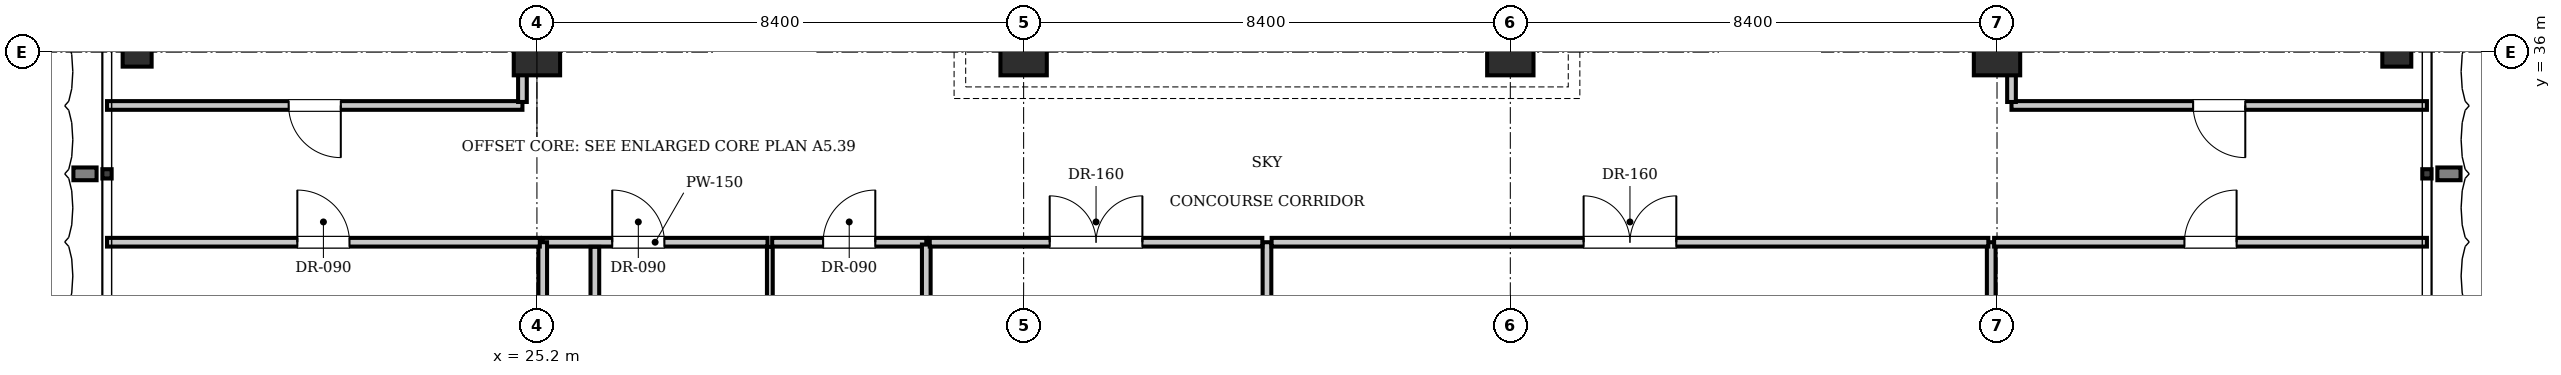
"""IFC4 building model, lengths in metres.
Left out: names, types, materials, properties, quantities, classifications, styles, units other than length and angle.
Written with IfcOpenShell. Run it as: python <this file> out.ifc"""

import sys

from ifc_helpers import new_model, si_unit, direction, frame, frame_2d, origin, origin_2d, place, context, subcontext, project, spatial, rectangle, i_section, extrude, element, fill, save


model = new_model("IFC4")
c1 = context("Model", 3, precision=1e-05, world=origin(), true_north=direction((0.0, 1.0)))
c2 = subcontext(c1, "Body", "Model", "MODEL_VIEW")
j1 = project(units=[si_unit("LENGTHUNIT", "METRE"), si_unit("PLANEANGLEUNIT", "RADIAN")], contexts=[c1])
p1 = place(None, origin())
s1 = spatial("IfcSite", under=j1, at=p1, CompositionType="ELEMENT")
p2 = place(p1, origin())
s2 = spatial("IfcBuilding", under=s1, at=p2, CompositionType="ELEMENT")
p3 = place(p2, frame((0.0, 0.0, 349.65)))
s3 = spatial("IfcBuildingStorey", under=s2, at=p3, CompositionType="ELEMENT", Elevation=349.65)
for number, where, z_axis, x_axis in (
    (1, (25.2, 36.0, 0.0), (0.0, 0.0, 1.0), (1.0, 0.0, 0.0)),
    (2, (33.6, 36.0, 0.0), (0.0, 0.0, 1.0), (1.0, 0.0, 0.0)),
    (3, (42.0, 36.0, 0.0), (0.0, 0.0, 1.0), (1.0, 0.0, 0.0)),
    (4, (50.4, 36.0, 0.0), (0.0, 0.0, 1.0), (1.0, 0.0, 0.0)),
):
    element("IfcColumn", number, at=place(p3, frame(where, z_axis=z_axis, x_axis=x_axis)), inside=s3, PredefinedType="COLUMN", context=c2, shape_type="SweptSolid", body=[
        extrude(rectangle(XDim=0.8, YDim=0.8, at=origin_2d()), origin(), (0.0, 0.0, 1.0), 4.55),
    ])
for number, where, z_axis, x_axis in (
    (5, (18.3, 36.0, 0.0), (0.0, 0.0, 1.0), (1.0, 0.0, 0.0)),
    (6, (57.3, 36.0, 0.0), (0.0, 0.0, 1.0), (1.0, 0.0, 0.0)),
):
    element("IfcColumn", number, at=place(p3, frame(where, z_axis=z_axis, x_axis=x_axis)), inside=s3, PredefinedType="COLUMN", context=c2, shape_type="SweptSolid", body=[
        extrude(i_section(OverallWidth=0.5, OverallDepth=0.5, WebThickness=0.022, FlangeThickness=0.032, at=origin_2d()), origin(), (0.0, 0.0, 1.0), 4.55),
    ])
p4 = place(p3, frame((25.3, 32.72, 0.0), z_axis=(0.0, 0.0, 1.0), x_axis=(1.0, 0.0, 0.0)))
e7 = element("IfcWall", 7, at=p4, inside=s3, PredefinedType="PARTITIONING", context=c2, shape_type="SweptSolid", body=[
    extrude(rectangle(XDim=3.88, YDim=0.15, at=frame_2d((1.94, 0.0))), origin(), (0.0, 0.0, 1.0), 4.29),
])
p5 = place(p4, frame((1.2, 0.0, 0.0)))
e8 = element("IfcOpeningElement", 8, at=p5, cuts=e7, PredefinedType="OPENING", context=c2, shape_type="SweptSolid", body=[
    extrude(rectangle(XDim=0.9, YDim=2.1, at=frame_2d((0.45, 1.05))), frame((0.0, 0.085, 0.0), z_axis=(0.0, -1.0, 0.0), x_axis=(1.0, 0.0, 0.0)), (0.0, 0.0, 1.0), 0.17),
])
p6 = place(p3, frame((29.26, 32.72, 0.0), z_axis=(0.0, 0.0, 1.0), x_axis=(1.0, 0.0, 0.0)))
e9 = element("IfcWall", 9, at=p6, inside=s3, PredefinedType="PARTITIONING", context=c2, shape_type="SweptSolid", body=[
    extrude(rectangle(XDim=2.66, YDim=0.15, at=frame_2d((1.33, 0.0))), origin(), (0.0, 0.0, 1.0), 4.29),
])
p7 = place(p6, frame((0.88, 0.0, 0.0)))
e10 = element("IfcOpeningElement", 10, at=p7, cuts=e9, PredefinedType="OPENING", context=c2, shape_type="SweptSolid", body=[
    extrude(rectangle(XDim=0.9, YDim=2.1, at=frame_2d((0.45, 1.05))), frame((0.0, 0.085, 0.0), z_axis=(0.0, -1.0, 0.0), x_axis=(1.0, 0.0, 0.0)), (0.0, 0.0, 1.0), 0.17),
])
p8 = place(p3, frame((26.2, 29.46, 0.0), z_axis=(0.0, 0.0, 1.0), x_axis=(0.0, 1.0, 0.0)))
e11 = element("IfcWall", 11, at=p8, inside=s3, PredefinedType="PARTITIONING", context=c2, shape_type="SweptSolid", body=[
    extrude(rectangle(XDim=3.18, YDim=0.15, at=frame_2d((1.59, 0.0))), origin(), (0.0, 0.0, 1.0), 4.29),
])
p9 = place(p3, frame((29.22, 29.46, 0.0), z_axis=(0.0, 0.0, 1.0), x_axis=(0.0, 1.0, 0.0)))
e12 = element("IfcWall", 12, at=p9, inside=s3, PredefinedType="PARTITIONING", context=c2, shape_type="SweptSolid", body=[
    extrude(rectangle(XDim=3.18, YDim=0.1, at=frame_2d((1.59, 0.0))), origin(), (0.0, 0.0, 1.0), 4.29),
])
p10 = place(p3, frame((31.92, 29.46, 0.0), z_axis=(0.0, 0.0, 1.0), x_axis=(0.0, 1.0, 0.0)))
e13 = element("IfcWall", 13, at=p10, inside=s3, PredefinedType="PARTITIONING", context=c2, shape_type="SweptSolid", body=[
    extrude(rectangle(XDim=3.22, YDim=0.15, at=frame_2d((1.61, 0.0))), origin(), (0.0, 0.0, 1.0), 4.29),
])
p11 = place(p3, frame((37.8, 13.88, 0.0), z_axis=(0.0, 0.0, 1.0), x_axis=(0.0, 1.0, 0.0)))
e14 = element("IfcWall", 14, at=p11, inside=s3, PredefinedType="PARTITIONING", context=c2, shape_type="SweptSolid", body=[
    extrude(rectangle(XDim=18.84, YDim=0.15, at=frame_2d((9.42, 0.0))), origin(), (0.0, 0.0, 1.0), 4.29),
])
for number, where, z_axis, x_axis in (
    (15, (25.3, 13.88, 0.0), (0.0, 0.0, 1.0), (0.0, 1.0, 0.0)),
    (16, (50.3, 13.88, 0.0), (0.0, 0.0, 1.0), (0.0, 1.0, 0.0)),
):
    element("IfcWall", number, at=place(p3, frame(where, z_axis=z_axis, x_axis=x_axis)), inside=s3, PredefinedType="PARTITIONING", context=c2, shape_type="SweptSolid", body=[
        extrude(rectangle(XDim=18.84, YDim=0.15, at=frame_2d((9.42, 0.0))), origin(), (0.0, 0.0, 1.0), 3.821),
    ])
p12 = place(p3, frame((17.78, 32.72, 0.0), z_axis=(0.0, 0.0, 1.0), x_axis=(1.0, 0.0, 0.0)))
e17 = element("IfcWall", 17, at=p12, inside=s3, PredefinedType="PARTITIONING", context=c2, shape_type="SweptSolid", body=[
    extrude(rectangle(XDim=7.47, YDim=0.15, at=frame_2d((3.735, 0.0))), origin(), (0.0, 0.0, 1.0), 4.29),
])
p13 = place(p12, frame((3.285, 0.0, 0.0)))
e18 = element("IfcOpeningElement", 18, at=p13, cuts=e17, PredefinedType="OPENING", context=c2, shape_type="SweptSolid", body=[
    extrude(rectangle(XDim=0.9, YDim=2.1, at=frame_2d((0.45, 1.05))), frame((0.0, 0.085, 0.0), z_axis=(0.0, -1.0, 0.0), x_axis=(1.0, 0.0, 0.0)), (0.0, 0.0, 1.0), 0.17),
])
p14 = place(p3, frame((31.98, 32.72, 0.0), z_axis=(0.0, 0.0, 1.0), x_axis=(1.0, 0.0, 0.0)))
e19 = element("IfcWall", 19, at=p14, inside=s3, PredefinedType="PARTITIONING", context=c2, shape_type="SweptSolid", body=[
    extrude(rectangle(XDim=5.74, YDim=0.15, at=frame_2d((2.87, 0.0))), origin(), (0.0, 0.0, 1.0), 4.29),
])
p15 = place(p14, frame((2.07, 0.0, 0.0)))
e20 = element("IfcOpeningElement", 20, at=p15, cuts=e19, PredefinedType="OPENING", context=c2, shape_type="SweptSolid", body=[
    extrude(rectangle(XDim=1.6, YDim=2.3, at=frame_2d((0.8, 1.15))), frame((0.0, 0.085, 0.0), z_axis=(0.0, -1.0, 0.0), x_axis=(1.0, 0.0, 0.0)), (0.0, 0.0, 1.0), 0.17),
])
p16 = place(p3, frame((37.88, 32.72, 0.0), z_axis=(0.0, 0.0, 1.0), x_axis=(1.0, 0.0, 0.0)))
e21 = element("IfcWall", 21, at=p16, inside=s3, PredefinedType="PARTITIONING", context=c2, shape_type="SweptSolid", body=[
    extrude(rectangle(XDim=12.37, YDim=0.15, at=frame_2d((6.185, 0.0))), origin(), (0.0, 0.0, 1.0), 4.29),
])
p17 = place(p16, frame((5.385, 0.0, 0.0)))
e22 = element("IfcOpeningElement", 22, at=p17, cuts=e21, PredefinedType="OPENING", context=c2, shape_type="SweptSolid", body=[
    extrude(rectangle(XDim=1.6, YDim=2.3, at=frame_2d((0.8, 1.15))), frame((0.0, 0.085, 0.0), z_axis=(0.0, -1.0, 0.0), x_axis=(1.0, 0.0, 0.0)), (0.0, 0.0, 1.0), 0.17),
])
p18 = place(p3, frame((50.35, 32.72, 0.0), z_axis=(0.0, 0.0, 1.0), x_axis=(1.0, 0.0, 0.0)))
e23 = element("IfcWall", 23, at=p18, inside=s3, PredefinedType="PARTITIONING", context=c2, shape_type="SweptSolid", body=[
    extrude(rectangle(XDim=7.47, YDim=0.15, at=frame_2d((3.735, 0.0))), origin(), (0.0, 0.0, 1.0), 4.29),
])
p19 = place(p18, frame((3.285, 0.0, 0.0)))
e24 = element("IfcOpeningElement", 24, at=p19, cuts=e23, PredefinedType="OPENING", context=c2, shape_type="SweptSolid", body=[
    extrude(rectangle(XDim=0.9, YDim=2.1, at=frame_2d((0.45, 1.05))), frame((0.0, 0.085, 0.0), z_axis=(0.0, -1.0, 0.0), x_axis=(1.0, 0.0, 0.0)), (0.0, 0.0, 1.0), 0.17),
])
p20 = place(p3, frame((17.78, 35.08, 0.0), z_axis=(0.0, 0.0, 1.0), x_axis=(1.0, 0.0, 0.0)))
e25 = element("IfcWall", 25, at=p20, inside=s3, PredefinedType="PARTITIONING", context=c2, shape_type="SweptSolid", body=[
    extrude(rectangle(XDim=7.17, YDim=0.15, at=frame_2d((3.585, 0.0))), origin(), (0.0, 0.0, 1.0), 4.29),
])
p21 = place(p20, frame((3.135, 0.0, 0.0)))
e26 = element("IfcOpeningElement", 26, at=p21, cuts=e25, PredefinedType="OPENING", context=c2, shape_type="SweptSolid", body=[
    extrude(rectangle(XDim=0.9, YDim=2.1, at=frame_2d((0.45, 1.05))), frame((0.0, 0.085, 0.0), z_axis=(0.0, -1.0, 0.0), x_axis=(1.0, 0.0, 0.0)), (0.0, 0.0, 1.0), 0.17),
])
p22 = place(p3, frame((24.95, 35.14, 0.0), z_axis=(0.0, 0.0, 1.0), x_axis=(0.0, 1.0, 0.0)))
e27 = element("IfcWall", 27, at=p22, inside=s3, PredefinedType="PARTITIONING", context=c2, shape_type="SweptSolid", body=[
    extrude(rectangle(XDim=18.78, YDim=0.15, at=frame_2d((9.39, 0.0))), origin(), (0.0, 0.0, 1.0), 4.29),
])
p23 = place(p3, frame((50.65, 35.08, 0.0), z_axis=(0.0, 0.0, 1.0), x_axis=(1.0, 0.0, 0.0)))
e28 = element("IfcWall", 28, at=p23, inside=s3, PredefinedType="PARTITIONING", context=c2, shape_type="SweptSolid", body=[
    extrude(rectangle(XDim=7.17, YDim=0.15, at=frame_2d((3.585, 0.0))), origin(), (0.0, 0.0, 1.0), 4.29),
])
p24 = place(p23, frame((3.135, 0.0, 0.0)))
e29 = element("IfcOpeningElement", 29, at=p24, cuts=e28, PredefinedType="OPENING", context=c2, shape_type="SweptSolid", body=[
    extrude(rectangle(XDim=0.9, YDim=2.1, at=frame_2d((0.45, 1.05))), frame((0.0, 0.085, 0.0), z_axis=(0.0, -1.0, 0.0), x_axis=(1.0, 0.0, 0.0)), (0.0, 0.0, 1.0), 0.17),
])
p25 = place(p3, frame((50.65, 35.14, 0.0), z_axis=(0.0, 0.0, 1.0), x_axis=(0.0, 1.0, 0.0)))
e30 = element("IfcWall", 30, at=p25, inside=s3, PredefinedType="PARTITIONING", context=c2, shape_type="SweptSolid", body=[
    extrude(rectangle(XDim=18.78, YDim=0.15, at=frame_2d((9.39, 0.0))), origin(), (0.0, 0.0, 1.0), 4.29),
])
p26 = place(p5, origin())
e31 = element("IfcDoor", 31, at=p26, inside=s3, OperationType="SINGLE_SWING_LEFT", PredefinedType="DOOR", context=c2, shape_type="SweptSolid", body=[
    extrude(rectangle(XDim=0.9, YDim=2.1, at=frame_2d((0.45, 1.05))), frame((0.0, 0.025, 0.0), z_axis=(0.0, -1.0, 0.0), x_axis=(1.0, 0.0, 0.0)), (0.0, 0.0, 1.0), 0.05),
])
fill(e8, e31)
p27 = place(p7, origin())
e32 = element("IfcDoor", 32, at=p27, inside=s3, OperationType="SINGLE_SWING_RIGHT", PredefinedType="DOOR", context=c2, shape_type="SweptSolid", body=[
    extrude(rectangle(XDim=0.9, YDim=2.1, at=frame_2d((0.45, 1.05))), frame((0.0, 0.025, 0.0), z_axis=(0.0, -1.0, 0.0), x_axis=(1.0, 0.0, 0.0)), (0.0, 0.0, 1.0), 0.05),
])
fill(e10, e32)
p28 = place(p13, origin())
e33 = element("IfcDoor", 33, at=p28, inside=s3, OperationType="SINGLE_SWING_LEFT", PredefinedType="DOOR", context=c2, shape_type="SweptSolid", body=[
    extrude(rectangle(XDim=0.9, YDim=2.1, at=frame_2d((0.45, 1.05))), frame((0.0, 0.025, 0.0), z_axis=(0.0, -1.0, 0.0), x_axis=(1.0, 0.0, 0.0)), (0.0, 0.0, 1.0), 0.05),
])
fill(e18, e33)
p29 = place(p15, origin())
e34 = element("IfcDoor", 34, at=p29, inside=s3, OperationType="DOUBLE_DOOR_SINGLE_SWING", PredefinedType="DOOR", context=c2, shape_type="SweptSolid", body=[
    extrude(rectangle(XDim=1.6, YDim=2.3, at=frame_2d((0.8, 1.15))), frame((0.0, 0.025, 0.0), z_axis=(0.0, -1.0, 0.0), x_axis=(1.0, 0.0, 0.0)), (0.0, 0.0, 1.0), 0.05),
])
fill(e20, e34)
p30 = place(p17, origin())
e35 = element("IfcDoor", 35, at=p30, inside=s3, OperationType="DOUBLE_DOOR_SINGLE_SWING", PredefinedType="DOOR", context=c2, shape_type="SweptSolid", body=[
    extrude(rectangle(XDim=1.6, YDim=2.3, at=frame_2d((0.8, 1.15))), frame((0.0, 0.025, 0.0), z_axis=(0.0, -1.0, 0.0), x_axis=(1.0, 0.0, 0.0)), (0.0, 0.0, 1.0), 0.05),
])
fill(e22, e35)
p31 = place(p19, origin())
e36 = element("IfcDoor", 36, at=p31, inside=s3, OperationType="SINGLE_SWING_RIGHT", PredefinedType="DOOR", context=c2, shape_type="SweptSolid", body=[
    extrude(rectangle(XDim=0.9, YDim=2.1, at=frame_2d((0.45, 1.05))), frame((0.0, 0.025, 0.0), z_axis=(0.0, -1.0, 0.0), x_axis=(1.0, 0.0, 0.0)), (0.0, 0.0, 1.0), 0.05),
])
fill(e24, e36)
p32 = place(p21, frame((0.9, 0.0, 0.0), z_axis=(0.0, 0.0, 1.0), x_axis=(-1.0, 0.0, 0.0)))
e37 = element("IfcDoor", 37, at=p32, inside=s3, OperationType="SINGLE_SWING_LEFT", PredefinedType="DOOR", context=c2, shape_type="SweptSolid", body=[
    extrude(rectangle(XDim=0.9, YDim=2.1, at=frame_2d((0.45, 1.05))), frame((0.0, 0.025, 0.0), z_axis=(0.0, -1.0, 0.0), x_axis=(1.0, 0.0, 0.0)), (0.0, 0.0, 1.0), 0.05),
])
fill(e26, e37)
p33 = place(p24, frame((0.9, 0.0, 0.0), z_axis=(0.0, 0.0, 1.0), x_axis=(-1.0, 0.0, 0.0)))
e38 = element("IfcDoor", 38, at=p33, inside=s3, OperationType="SINGLE_SWING_LEFT", PredefinedType="DOOR", context=c2, shape_type="SweptSolid", body=[
    extrude(rectangle(XDim=0.9, YDim=2.1, at=frame_2d((0.45, 1.05))), frame((0.0, 0.025, 0.0), z_axis=(0.0, -1.0, 0.0), x_axis=(1.0, 0.0, 0.0)), (0.0, 0.0, 1.0), 0.05),
])
fill(e29, e38)
save(model, sys.argv[1])
